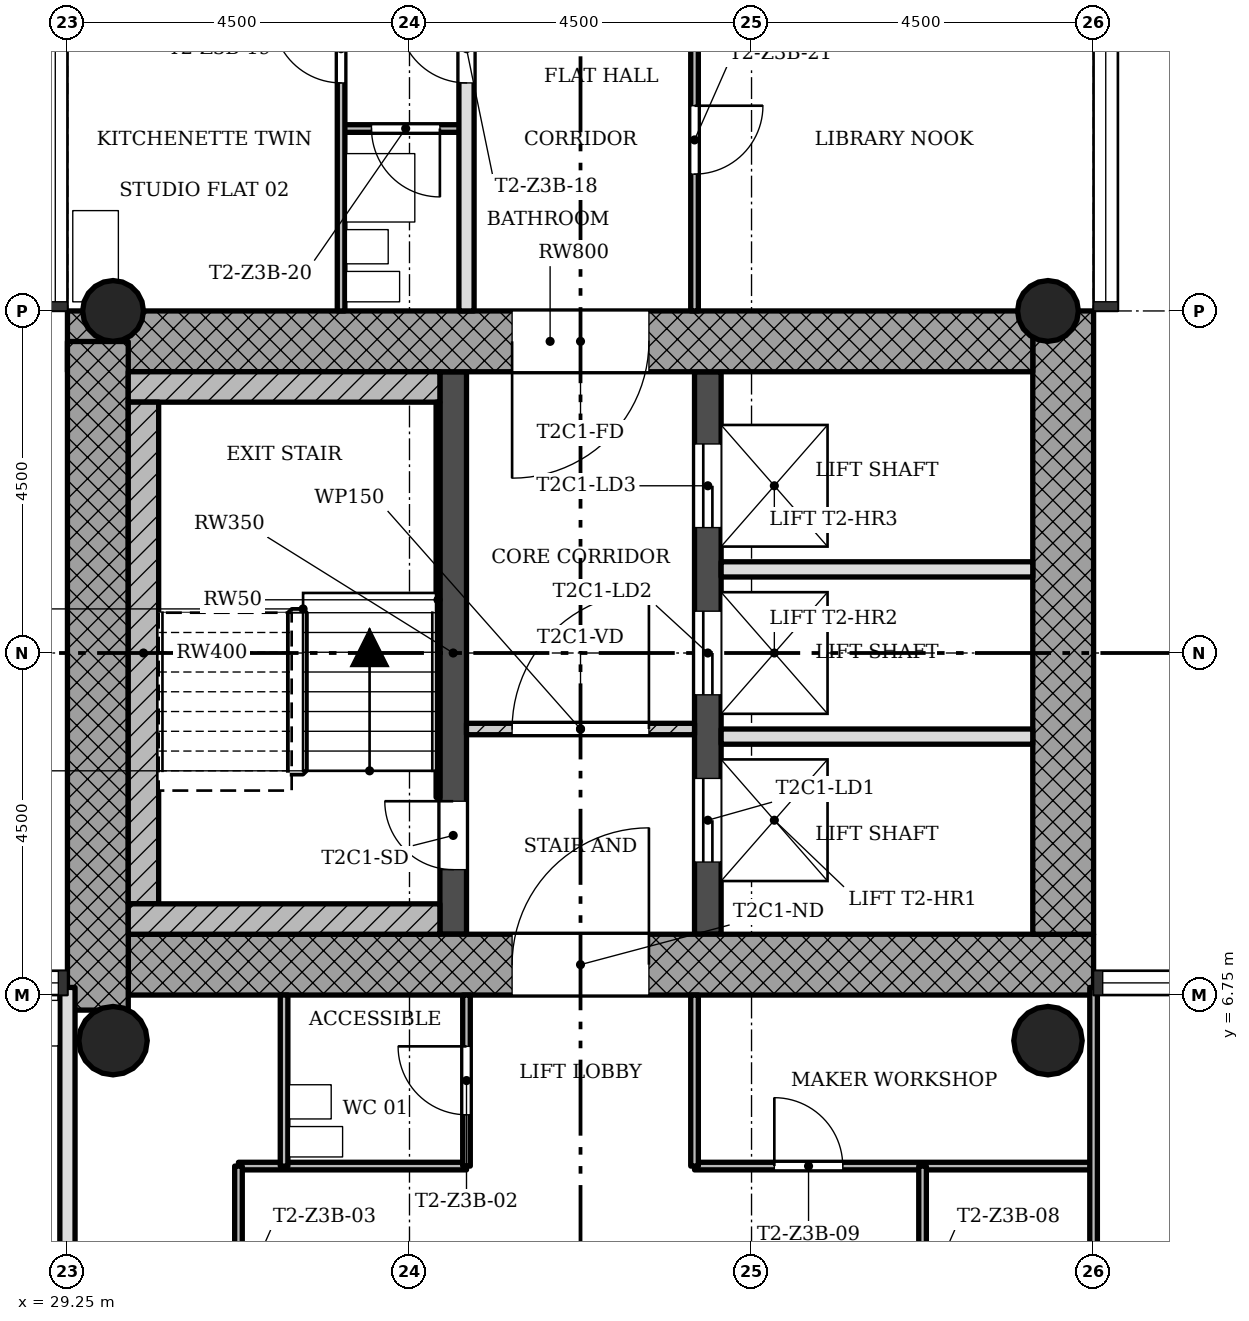
"""IFC4 building model, lengths in metres.
Left out: names, types, materials, properties, quantities, classifications, styles, units other than length and angle.
Written with IfcOpenShell. Run it as: python <this file> out.ifc"""

import sys

from ifc_helpers import new_model, si_unit, direction, frame, frame_2d, origin, origin_2d, place, context, subcontext, project, spatial, rectangle, hollow_circle, extrude, element, fill, save


model = new_model("IFC4")
c1 = context("Model", 3, precision=1e-05, world=origin(), true_north=direction((0.0, 1.0)))
c2 = subcontext(c1, "Body", "Model", "MODEL_VIEW")
j1 = project(units=[si_unit("LENGTHUNIT", "METRE"), si_unit("PLANEANGLEUNIT", "RADIAN")], contexts=[c1])
p1 = place(None, origin())
s1 = spatial("IfcSite", under=j1, at=p1, CompositionType="ELEMENT")
p2 = place(p1, origin())
s2 = spatial("IfcBuilding", under=s1, at=p2, CompositionType="ELEMENT")
p3 = place(p2, frame((0.0, 0.0, 147.3)))
s3 = spatial("IfcBuildingStorey", under=s2, at=p3, CompositionType="ELEMENT", Elevation=147.3)
p4 = place(p3, frame((30.05, 7.15, 0.0), z_axis=(0.0, 0.0, 1.0), x_axis=(1.0, 0.0, 0.0)))
e1 = element("IfcWall", 1, at=p4, inside=s3, PredefinedType="SHEAR", context=c2, shape_type="SweptSolid", body=[
    extrude(rectangle(XDim=12.7, YDim=0.8, at=frame_2d((6.35, 0.0))), origin(), (0.0, 0.0, 1.0), 3.4),
])
p5 = place(p4, frame((5.05, 0.0, 0.0)))
e2 = element("IfcOpeningElement", 2, at=p5, cuts=e1, PredefinedType="OPENING", context=c2, shape_type="SweptSolid", body=[
    extrude(rectangle(XDim=1.8, YDim=2.1, at=frame_2d((0.9, 1.05))), frame((0.0, 0.41, 0.0), z_axis=(0.0, -1.0, 0.0), x_axis=(1.0, 0.0, 0.0)), (0.0, 0.0, 1.0), 0.82),
])
p6 = place(p3, frame((42.35, 7.55, 0.0), z_axis=(0.0, 0.0, 1.0), x_axis=(0.0, 1.0, 0.0)))
e3 = element("IfcWall", 3, at=p6, inside=s3, PredefinedType="SHEAR", context=c2, shape_type="SweptSolid", body=[
    extrude(rectangle(XDim=8.2, YDim=0.8, at=frame_2d((4.1, 0.0))), origin(), (0.0, 0.0, 1.0), 3.4),
])
p7 = place(p3, frame((41.95, 15.35, 0.0), z_axis=(0.0, 0.0, 1.0), x_axis=(-1.0, 0.0, 0.0)))
e4 = element("IfcWall", 4, at=p7, inside=s3, PredefinedType="SHEAR", context=c2, shape_type="SweptSolid", body=[
    extrude(rectangle(XDim=12.7, YDim=0.8, at=frame_2d((6.35, 0.0))), origin(), (0.0, 0.0, 1.0), 3.4),
])
p8 = place(p7, frame((5.05, 0.0, 0.0)))
e5 = element("IfcOpeningElement", 5, at=p8, cuts=e4, PredefinedType="OPENING", context=c2, shape_type="SweptSolid", body=[
    extrude(rectangle(XDim=1.8, YDim=2.1, at=frame_2d((0.9, 1.05))), frame((0.0, 0.41, 0.0), z_axis=(0.0, -1.0, 0.0), x_axis=(1.0, 0.0, 0.0)), (0.0, 0.0, 1.0), 0.82),
])
p9 = place(p3, frame((29.65, 15.348, 0.0), z_axis=(0.0, 0.0, 1.0), x_axis=(0.0, -1.0, 0.0)))
e6 = element("IfcWall", 6, at=p9, inside=s3, PredefinedType="SHEAR", context=c2, shape_type="SweptSolid", body=[
    extrude(rectangle(XDim=8.796, YDim=0.8, at=frame_2d((4.398, 0.0))), origin(), (0.0, 0.0, 1.0), 3.4),
])
p10 = place(p3, frame((34.325, 7.55, 0.0), z_axis=(0.0, 0.0, 1.0), x_axis=(0.0, 1.0, 0.0)))
e7 = element("IfcWall", 7, at=p10, inside=s3, PredefinedType="SHEAR", context=c2, shape_type="SweptSolid", body=[
    extrude(rectangle(XDim=7.4, YDim=0.35, at=frame_2d((3.7, 0.0))), origin(), (0.0, 0.0, 1.0), 3.4),
])
p11 = place(p10, frame((0.85, 0.0, 0.0)))
e8 = element("IfcOpeningElement", 8, at=p11, cuts=e7, PredefinedType="OPENING", context=c2, shape_type="SweptSolid", body=[
    extrude(rectangle(XDim=0.9, YDim=2.1, at=frame_2d((0.45, 1.05))), frame((0.0, 0.185, 0.0), z_axis=(0.0, -1.0, 0.0), x_axis=(1.0, 0.0, 0.0)), (0.0, 0.0, 1.0), 0.37),
])
p12 = place(p3, frame((37.675, 7.55, 0.0), z_axis=(0.0, 0.0, 1.0), x_axis=(0.0, 1.0, 0.0)))
e9 = element("IfcWall", 9, at=p12, inside=s3, PredefinedType="SHEAR", context=c2, shape_type="SweptSolid", body=[
    extrude(rectangle(XDim=7.4, YDim=0.35, at=frame_2d((3.7, 0.0))), origin(), (0.0, 0.0, 1.0), 3.4),
])
p13 = place(p12, frame((0.95, 0.0, 0.0)))
e10 = element("IfcOpeningElement", 10, at=p13, cuts=e9, PredefinedType="OPENING", context=c2, shape_type="SweptSolid", body=[
    extrude(rectangle(XDim=1.1, YDim=2.1, at=frame_2d((0.55, 1.05))), frame((0.0, 0.185, 0.0), z_axis=(0.0, -1.0, 0.0), x_axis=(1.0, 0.0, 0.0)), (0.0, 0.0, 1.0), 0.37),
])
p14 = place(p12, frame((3.15, 0.0, 0.0)))
e11 = element("IfcOpeningElement", 11, at=p14, cuts=e9, PredefinedType="OPENING", context=c2, shape_type="SweptSolid", body=[
    extrude(rectangle(XDim=1.1, YDim=2.1, at=frame_2d((0.55, 1.05))), frame((0.0, 0.185, 0.0), z_axis=(0.0, -1.0, 0.0), x_axis=(1.0, 0.0, 0.0)), (0.0, 0.0, 1.0), 0.37),
])
p15 = place(p12, frame((5.35, 0.0, 0.0)))
e12 = element("IfcOpeningElement", 12, at=p15, cuts=e9, PredefinedType="OPENING", context=c2, shape_type="SweptSolid", body=[
    extrude(rectangle(XDim=1.1, YDim=2.1, at=frame_2d((0.55, 1.05))), frame((0.0, 0.185, 0.0), z_axis=(0.0, -1.0, 0.0), x_axis=(1.0, 0.0, 0.0)), (0.0, 0.0, 1.0), 0.37),
])
for number, where, z_axis, x_axis in (
    (13, (42.15, 15.75, 0.0), (0.0, 0.0, 1.0), (1.0, 0.0, 0.0)),
    (14, (29.85, 15.75, 0.0), (0.0, 0.0, 1.0), (1.0, 0.0, 0.0)),
):
    element("IfcColumn", number, at=place(p3, frame(where, z_axis=z_axis, x_axis=x_axis)), inside=s3, PredefinedType="COLUMN", context=c2, shape_type="SweptSolid", body=[
        extrude(hollow_circle(Radius=0.4, WallThickness=0.028, at=origin_2d()), origin(), (0.0, 0.0, 1.0), 3.4),
    ])
for number, where, z_axis, x_axis in (
    (15, (42.15, 6.15, 0.0), (0.0, 0.0, 1.0), (1.0, 0.0, 0.0)),
    (16, (29.85, 6.15, 0.0), (0.0, 0.0, 1.0), (1.0, 0.0, 0.0)),
):
    element("IfcColumn", number, at=place(p3, frame(where, z_axis=z_axis, x_axis=x_axis)), inside=s3, PredefinedType="COLUMN", context=c2, shape_type="SweptSolid", body=[
        extrude(hollow_circle(Radius=0.45, WallThickness=0.032, at=origin_2d()), origin(), (0.0, 0.0, 1.0), 3.4),
    ])
p16 = place(p3, frame((37.5, 10.25, 0.0), z_axis=(0.0, 0.0, 1.0), x_axis=(-1.0, 0.0, 0.0)))
e17 = element("IfcWall", 17, at=p16, inside=s3, PredefinedType="PARTITIONING", context=c2, shape_type="SweptSolid", body=[
    extrude(rectangle(XDim=3.0, YDim=0.15, at=frame_2d((1.5, 0.0))), origin(), (0.0, 0.0, 1.0), 3.0),
])
p17 = place(p16, frame((0.6, 0.0, 0.0)))
e18 = element("IfcOpeningElement", 18, at=p17, cuts=e17, PredefinedType="OPENING", context=c2, shape_type="SweptSolid", body=[
    extrude(rectangle(XDim=1.8, YDim=2.1, at=frame_2d((0.9, 1.05))), frame((0.0, 0.085, 0.0), z_axis=(0.0, -1.0, 0.0), x_axis=(1.0, 0.0, 0.0)), (0.0, 0.0, 1.0), 0.17),
])
for number, where, z_axis, x_axis in (
    (19, (41.95, 10.15, 0.0), (0.0, 0.0, 1.0), (-1.0, 0.0, 0.0)),
    (20, (41.95, 12.35, 0.0), (0.0, 0.0, 1.0), (-1.0, 0.0, 0.0)),
):
    element("IfcWall", number, at=place(p3, frame(where, z_axis=z_axis, x_axis=x_axis)), inside=s3, PredefinedType="SOLIDWALL", context=c2, shape_type="SweptSolid", body=[
        extrude(rectangle(XDim=4.1, YDim=0.2, at=frame_2d((2.05, 0.0))), origin(), (0.0, 0.0, 1.0), 3.0),
    ])
p18 = place(p3, frame((42.75, 4.5, 0.0), z_axis=(0.0, 0.0, 1.0), x_axis=(-1.0, 0.0, 0.0)))
e21 = element("IfcWall", 21, at=p18, inside=s3, PredefinedType="PARTITIONING", context=c2, shape_type="SweptSolid", body=[
    extrude(rectangle(XDim=5.25, YDim=0.1, at=frame_2d((2.625, 0.0))), origin(), (0.0, 0.0, 1.0), 3.0),
])
p19 = place(p18, frame((3.3, 0.0, 0.0)))
e22 = element("IfcOpeningElement", 22, at=p19, cuts=e21, PredefinedType="OPENING", context=c2, shape_type="SweptSolid", body=[
    extrude(rectangle(XDim=0.9, YDim=2.1, at=frame_2d((0.45, 1.05))), frame((0.0, 0.06, 0.0), z_axis=(0.0, -1.0, 0.0), x_axis=(1.0, 0.0, 0.0)), (0.0, 0.0, 1.0), 0.12),
])
p20 = place(p3, frame((34.5, 4.5, 0.0), z_axis=(0.0, 0.0, 1.0), x_axis=(-1.0, 0.0, 0.0)))
e23 = element("IfcWall", 23, at=p20, inside=s3, PredefinedType="PARTITIONING", context=c2, shape_type="SweptSolid", body=[
    extrude(rectangle(XDim=3.0, YDim=0.1, at=frame_2d((1.5, 0.0))), origin(), (0.0, 0.0, 1.0), 3.0),
])
p21 = place(p3, frame((34.5, 18.15, 0.0), z_axis=(0.0, 0.0, 1.0), x_axis=(-1.0, 0.0, 0.0)))
e24 = element("IfcWall", 24, at=p21, inside=s3, PredefinedType="PARTITIONING", context=c2, shape_type="SweptSolid", body=[
    extrude(rectangle(XDim=1.65, YDim=0.1, at=frame_2d((0.825, 0.0))), origin(), (0.0, 0.0, 1.0), 3.0),
])
p22 = place(p21, frame((0.35, 0.0, 0.0)))
e25 = element("IfcOpeningElement", 25, at=p22, cuts=e24, PredefinedType="OPENING", context=c2, shape_type="SweptSolid", body=[
    extrude(rectangle(XDim=0.9, YDim=2.1, at=frame_2d((0.45, 1.05))), frame((0.0, 0.06, 0.0), z_axis=(0.0, -1.0, 0.0), x_axis=(1.0, 0.0, 0.0)), (0.0, 0.0, 1.0), 0.12),
])
p23 = place(p3, frame((42.75, 0.9, 0.0), z_axis=(0.0, 0.0, 1.0), x_axis=(0.0, 1.0, 0.0)))
e26 = element("IfcWall", 26, at=p23, inside=s3, PredefinedType="PARTITIONING", context=c2, shape_type="SweptSolid", body=[
    extrude(rectangle(XDim=5.95, YDim=0.1, at=frame_2d((2.975, 0.0))), origin(), (0.0, 0.0, 1.0), 3.0),
])
p24 = place(p3, frame((40.5, 0.9, 0.0), z_axis=(0.0, 0.0, 1.0), x_axis=(0.0, 1.0, 0.0)))
e27 = element("IfcWall", 27, at=p24, inside=s3, PredefinedType="PARTITIONING", context=c2, shape_type="SweptSolid", body=[
    extrude(rectangle(XDim=3.6, YDim=0.1, at=frame_2d((1.8, 0.0))), origin(), (0.0, 0.0, 1.0), 3.0),
])
p25 = place(p24, frame((1.35, 0.0, 0.0)))
e28 = element("IfcOpeningElement", 28, at=p25, cuts=e27, PredefinedType="OPENING", context=c2, shape_type="SweptSolid", body=[
    extrude(rectangle(XDim=0.9, YDim=2.1, at=frame_2d((0.45, 1.05))), frame((0.0, 0.06, 0.0), z_axis=(0.0, -1.0, 0.0), x_axis=(1.0, 0.0, 0.0)), (0.0, 0.0, 1.0), 0.12),
])
p26 = place(p3, frame((37.5, 4.5, 0.0), z_axis=(0.0, 0.0, 1.0), x_axis=(0.0, 1.0, 0.0)))
e29 = element("IfcWall", 29, at=p26, inside=s3, PredefinedType="PARTITIONING", context=c2, shape_type="SweptSolid", body=[
    extrude(rectangle(XDim=2.25, YDim=0.1, at=frame_2d((1.125, 0.0))), origin(), (0.0, 0.0, 1.0), 3.0),
])
p27 = place(p3, frame((37.5, 15.75, 0.0), z_axis=(0.0, 0.0, 1.0), x_axis=(0.0, 1.0, 0.0)))
e30 = element("IfcWall", 30, at=p27, inside=s3, PredefinedType="PARTITIONING", context=c2, shape_type="SweptSolid", body=[
    extrude(rectangle(XDim=4.5, YDim=0.1, at=frame_2d((2.25, 0.0))), origin(), (0.0, 0.0, 1.0), 3.0),
])
p28 = place(p27, frame((1.8, 0.0, 0.0)))
e31 = element("IfcOpeningElement", 31, at=p28, cuts=e30, PredefinedType="OPENING", context=c2, shape_type="SweptSolid", body=[
    extrude(rectangle(XDim=0.9, YDim=2.1, at=frame_2d((0.45, 1.05))), frame((0.0, 0.06, 0.0), z_axis=(0.0, -1.0, 0.0), x_axis=(1.0, 0.0, 0.0)), (0.0, 0.0, 1.0), 0.12),
])
p29 = place(p3, frame((34.5, 4.5, 0.0), z_axis=(0.0, 0.0, 1.0), x_axis=(0.0, 1.0, 0.0)))
e32 = element("IfcWall", 32, at=p29, inside=s3, PredefinedType="PARTITIONING", context=c2, shape_type="SweptSolid", body=[
    extrude(rectangle(XDim=2.25, YDim=0.1, at=frame_2d((1.125, 0.0))), origin(), (0.0, 0.0, 1.0), 3.0),
])
p30 = place(p29, frame((0.675, 0.0, 0.0)))
e33 = element("IfcOpeningElement", 33, at=p30, cuts=e32, PredefinedType="OPENING", context=c2, shape_type="SweptSolid", body=[
    extrude(rectangle(XDim=0.9, YDim=2.1, at=frame_2d((0.45, 1.05))), frame((0.0, 0.06, 0.0), z_axis=(0.0, -1.0, 0.0), x_axis=(1.0, 0.0, 0.0)), (0.0, 0.0, 1.0), 0.12),
])
p31 = place(p3, frame((34.5, 15.75, 0.0), z_axis=(0.0, 0.0, 1.0), x_axis=(0.0, 1.0, 0.0)))
e34 = element("IfcWall", 34, at=p31, inside=s3, PredefinedType="SOLIDWALL", context=c2, shape_type="SweptSolid", body=[
    extrude(rectangle(XDim=4.5, YDim=0.2, at=frame_2d((2.25, 0.0))), origin(), (0.0, 0.0, 1.0), 3.0),
])
p32 = place(p31, frame((3.0, 0.0, 0.0)))
e35 = element("IfcOpeningElement", 35, at=p32, cuts=e34, PredefinedType="OPENING", context=c2, shape_type="SweptSolid", body=[
    extrude(rectangle(XDim=0.9, YDim=2.1, at=frame_2d((0.45, 1.05))), frame((0.0, 0.11, 0.0), z_axis=(0.0, -1.0, 0.0), x_axis=(1.0, 0.0, 0.0)), (0.0, 0.0, 1.0), 0.22),
])
p33 = place(p3, frame((32.85, 15.75, 0.0), z_axis=(0.0, 0.0, 1.0), x_axis=(0.0, 1.0, 0.0)))
e36 = element("IfcWall", 36, at=p33, inside=s3, PredefinedType="PARTITIONING", context=c2, shape_type="SweptSolid", body=[
    extrude(rectangle(XDim=4.5, YDim=0.1, at=frame_2d((2.25, 0.0))), origin(), (0.0, 0.0, 1.0), 3.0),
])
p34 = place(p33, frame((3.0, 0.0, 0.0)))
e37 = element("IfcOpeningElement", 37, at=p34, cuts=e36, PredefinedType="OPENING", context=c2, shape_type="SweptSolid", body=[
    extrude(rectangle(XDim=0.9, YDim=2.1, at=frame_2d((0.45, 1.05))), frame((0.0, 0.06, 0.0), z_axis=(0.0, -1.0, 0.0), x_axis=(1.0, 0.0, 0.0)), (0.0, 0.0, 1.0), 0.12),
])
p35 = place(p3, frame((32.1, 4.5, 0.0), z_axis=(0.0, 0.0, 1.0), x_axis=(0.0, 1.0, 0.0)))
e38 = element("IfcWall", 38, at=p35, inside=s3, PredefinedType="PARTITIONING", context=c2, shape_type="SweptSolid", body=[
    extrude(rectangle(XDim=2.25, YDim=0.1, at=frame_2d((1.125, 0.0))), origin(), (0.0, 0.0, 1.0), 3.0),
])
p36 = place(p3, frame((31.5, 0.9, 0.0), z_axis=(0.0, 0.0, 1.0), x_axis=(0.0, 1.0, 0.0)))
e39 = element("IfcWall", 39, at=p36, inside=s3, PredefinedType="PARTITIONING", context=c2, shape_type="SweptSolid", body=[
    extrude(rectangle(XDim=3.6, YDim=0.1, at=frame_2d((1.8, 0.0))), origin(), (0.0, 0.0, 1.0), 3.0),
])
p37 = place(p36, frame((1.35, 0.0, 0.0)))
e40 = element("IfcOpeningElement", 40, at=p37, cuts=e39, PredefinedType="OPENING", context=c2, shape_type="SweptSolid", body=[
    extrude(rectangle(XDim=0.9, YDim=2.1, at=frame_2d((0.45, 1.05))), frame((0.0, 0.06, 0.0), z_axis=(0.0, -1.0, 0.0), x_axis=(1.0, 0.0, 0.0)), (0.0, 0.0, 1.0), 0.12),
])
p38 = place(p3, frame((29.25, 0.9, 0.0), z_axis=(0.0, 0.0, 1.0), x_axis=(0.0, 1.0, 0.0)))
e41 = element("IfcWall", 41, at=p38, inside=s3, PredefinedType="SOLIDWALL", context=c2, shape_type="SweptSolid", body=[
    extrude(rectangle(XDim=5.95, YDim=0.2, at=frame_2d((2.975, 0.0))), origin(), (0.0, 0.0, 1.0), 3.0),
])
p39 = place(p3, frame((34.15, 14.75, 0.0), z_axis=(0.0, 0.0, 1.0), x_axis=(-1.0, 0.0, 0.0)))
e42 = element("IfcWall", 42, at=p39, inside=s3, PredefinedType="SHEAR", context=c2, shape_type="SweptSolid", body=[
    extrude(rectangle(XDim=4.1, YDim=0.4, at=frame_2d((2.05, 0.0))), origin(), (0.0, 0.0, 1.0), 3.4),
])
p40 = place(p3, frame((30.25, 7.95, 0.0), z_axis=(0.0, 0.0, 1.0), x_axis=(0.0, 1.0, 0.0)))
e43 = element("IfcWall", 43, at=p40, inside=s3, PredefinedType="SHEAR", context=c2, shape_type="SweptSolid", body=[
    extrude(rectangle(XDim=6.6, YDim=0.4, at=frame_2d((3.3, 0.0))), origin(), (0.0, 0.0, 1.0), 3.4),
])
p41 = place(p3, frame((34.15, 7.75, 0.0), z_axis=(0.0, 0.0, 1.0), x_axis=(-1.0, 0.0, 0.0)))
e44 = element("IfcWall", 44, at=p41, inside=s3, PredefinedType="SHEAR", context=c2, shape_type="SweptSolid", body=[
    extrude(rectangle(XDim=4.1, YDim=0.4, at=frame_2d((2.05, 0.0))), origin(), (0.0, 0.0, 1.0), 3.4),
])
p42 = place(p3, frame((34.125, 9.35, 0.0), z_axis=(0.0, 0.0, 1.0), x_axis=(0.0, 1.0, 0.0)))
e45 = element("IfcWall", 45, at=p42, inside=s3, PredefinedType="SHEAR", context=c2, shape_type="SweptSolid", body=[
    extrude(rectangle(XDim=5.2, YDim=0.05, at=frame_2d((2.6, 0.0))), origin(), (0.0, 0.0, 1.0), 3.4),
])
p43 = place(p17, origin())
e46 = element("IfcDoor", 46, at=p43, inside=s3, OperationType="SINGLE_SWING_LEFT", PredefinedType="DOOR", context=c2, shape_type="SweptSolid", body=[
    extrude(rectangle(XDim=1.8, YDim=2.1, at=frame_2d((0.9, 1.05))), frame((0.0, 0.025, 0.0), z_axis=(0.0, -1.0, 0.0), x_axis=(1.0, 0.0, 0.0)), (0.0, 0.0, 1.0), 0.05),
])
fill(e18, e46)
p44 = place(p30, origin())
e47 = element("IfcDoor", 47, at=p44, inside=s3, OperationType="SINGLE_SWING_LEFT", PredefinedType="DOOR", context=c2, shape_type="SweptSolid", body=[
    extrude(rectangle(XDim=0.9, YDim=2.1, at=frame_2d((0.45, 1.05))), frame((0.0, 0.025, 0.0), z_axis=(0.0, -1.0, 0.0), x_axis=(1.0, 0.0, 0.0)), (0.0, 0.0, 1.0), 0.05),
])
fill(e33, e47)
p45 = place(p19, origin())
e48 = element("IfcDoor", 48, at=p45, inside=s3, OperationType="SINGLE_SWING_RIGHT", PredefinedType="DOOR", context=c2, shape_type="SweptSolid", body=[
    extrude(rectangle(XDim=0.9, YDim=2.1, at=frame_2d((0.45, 1.05))), frame((0.0, 0.025, 0.0), z_axis=(0.0, -1.0, 0.0), x_axis=(1.0, 0.0, 0.0)), (0.0, 0.0, 1.0), 0.05),
])
fill(e22, e48)
p46 = place(p32, origin())
e49 = element("IfcDoor", 49, at=p46, inside=s3, OperationType="SINGLE_SWING_LEFT", PredefinedType="DOOR", context=c2, shape_type="SweptSolid", body=[
    extrude(rectangle(XDim=0.9, YDim=2.1, at=frame_2d((0.45, 1.05))), frame((0.0, 0.025, 0.0), z_axis=(0.0, -1.0, 0.0), x_axis=(1.0, 0.0, 0.0)), (0.0, 0.0, 1.0), 0.05),
])
fill(e35, e49)
p47 = place(p34, origin())
e50 = element("IfcDoor", 50, at=p47, inside=s3, OperationType="SINGLE_SWING_LEFT", PredefinedType="DOOR", context=c2, shape_type="SweptSolid", body=[
    extrude(rectangle(XDim=0.9, YDim=2.1, at=frame_2d((0.45, 1.05))), frame((0.0, 0.025, 0.0), z_axis=(0.0, -1.0, 0.0), x_axis=(1.0, 0.0, 0.0)), (0.0, 0.0, 1.0), 0.05),
])
fill(e37, e50)
p48 = place(p22, origin())
e51 = element("IfcDoor", 51, at=p48, inside=s3, OperationType="SINGLE_SWING_RIGHT", PredefinedType="DOOR", context=c2, shape_type="SweptSolid", body=[
    extrude(rectangle(XDim=0.9, YDim=2.1, at=frame_2d((0.45, 1.05))), frame((0.0, 0.025, 0.0), z_axis=(0.0, -1.0, 0.0), x_axis=(1.0, 0.0, 0.0)), (0.0, 0.0, 1.0), 0.05),
])
fill(e25, e51)
p49 = place(p28, origin())
e52 = element("IfcDoor", 52, at=p49, inside=s3, OperationType="SINGLE_SWING_RIGHT", PredefinedType="DOOR", context=c2, shape_type="SweptSolid", body=[
    extrude(rectangle(XDim=0.9, YDim=2.1, at=frame_2d((0.45, 1.05))), frame((0.0, 0.025, 0.0), z_axis=(0.0, -1.0, 0.0), x_axis=(1.0, 0.0, 0.0)), (0.0, 0.0, 1.0), 0.05),
])
fill(e31, e52)
p50 = place(p11, origin())
e53 = element("IfcDoor", 53, at=p50, inside=s3, OperationType="SINGLE_SWING_LEFT", PredefinedType="DOOR", context=c2, shape_type="SweptSolid", body=[
    extrude(rectangle(XDim=0.9, YDim=2.1, at=frame_2d((0.45, 1.05))), frame((0.0, 0.025, 0.0), z_axis=(0.0, -1.0, 0.0), x_axis=(1.0, 0.0, 0.0)), (0.0, 0.0, 1.0), 0.05),
])
fill(e8, e53)
p51 = place(p13, origin())
e54 = element("IfcDoor", 54, at=p51, inside=s3, OperationType="SLIDING_TO_LEFT", PredefinedType="DOOR", context=c2, shape_type="SweptSolid", body=[
    extrude(rectangle(XDim=1.1, YDim=2.1, at=frame_2d((0.55, 1.05))), frame((0.0, 0.025, 0.0), z_axis=(0.0, -1.0, 0.0), x_axis=(1.0, 0.0, 0.0)), (0.0, 0.0, 1.0), 0.05),
])
fill(e10, e54)
p52 = place(p14, origin())
e55 = element("IfcDoor", 55, at=p52, inside=s3, OperationType="SLIDING_TO_LEFT", PredefinedType="DOOR", context=c2, shape_type="SweptSolid", body=[
    extrude(rectangle(XDim=1.1, YDim=2.1, at=frame_2d((0.55, 1.05))), frame((0.0, 0.025, 0.0), z_axis=(0.0, -1.0, 0.0), x_axis=(1.0, 0.0, 0.0)), (0.0, 0.0, 1.0), 0.05),
])
fill(e11, e55)
p53 = place(p15, origin())
e56 = element("IfcDoor", 56, at=p53, inside=s3, OperationType="SLIDING_TO_LEFT", PredefinedType="DOOR", context=c2, shape_type="SweptSolid", body=[
    extrude(rectangle(XDim=1.1, YDim=2.1, at=frame_2d((0.55, 1.05))), frame((0.0, 0.025, 0.0), z_axis=(0.0, -1.0, 0.0), x_axis=(1.0, 0.0, 0.0)), (0.0, 0.0, 1.0), 0.05),
])
fill(e12, e56)
p54 = place(p5, origin())
e57 = element("IfcDoor", 57, at=p54, inside=s3, OperationType="SINGLE_SWING_LEFT", PredefinedType="DOOR", context=c2, shape_type="SweptSolid", body=[
    extrude(rectangle(XDim=1.8, YDim=2.1, at=frame_2d((0.9, 1.05))), frame((0.0, 0.025, 0.0), z_axis=(0.0, -1.0, 0.0), x_axis=(1.0, 0.0, 0.0)), (0.0, 0.0, 1.0), 0.05),
])
fill(e2, e57)
p55 = place(p8, origin())
e58 = element("IfcDoor", 58, at=p55, inside=s3, OperationType="SINGLE_SWING_LEFT", PredefinedType="DOOR", context=c2, shape_type="SweptSolid", body=[
    extrude(rectangle(XDim=1.8, YDim=2.1, at=frame_2d((0.9, 1.05))), frame((0.0, 0.025, 0.0), z_axis=(0.0, -1.0, 0.0), x_axis=(1.0, 0.0, 0.0)), (0.0, 0.0, 1.0), 0.05),
])
fill(e5, e58)
save(model, sys.argv[1])
